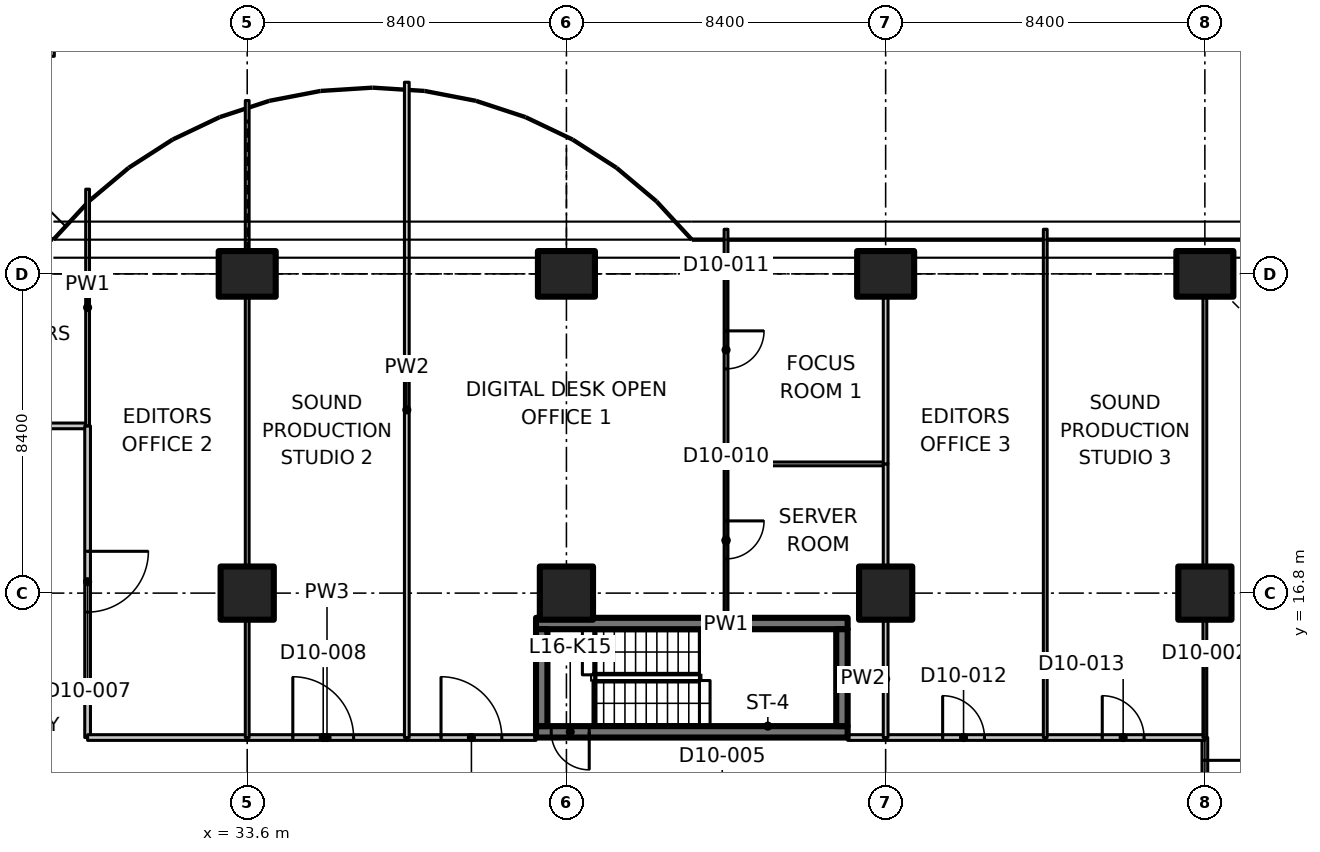
"""IFC4 building model, lengths in metres.
Left out: names, types, materials, properties, quantities, classifications, styles, units other than length and angle.
Written with IfcOpenShell. Run it as: python <this file> out.ifc"""

import sys

from ifc_helpers import new_model, si_unit, direction, frame, frame_2d, origin, origin_2d, place, context, subcontext, project, spatial, polyline, rectangle, outline, extrude, element, fill, save


model = new_model("IFC4")
c1 = context("Model", 3, precision=1e-05, world=origin(), true_north=direction((0.0, 1.0)))
c2 = subcontext(c1, "Body", "Model", "MODEL_VIEW")
j1 = project(units=[si_unit("LENGTHUNIT", "METRE"), si_unit("PLANEANGLEUNIT", "RADIAN")], contexts=[c1])
p1 = place(None, origin())
s1 = spatial("IfcSite", under=j1, at=p1, CompositionType="ELEMENT")
p2 = place(p1, origin())
s2 = spatial("IfcBuilding", under=s1, at=p2, CompositionType="ELEMENT")
p3 = place(p2, frame((0.0, 0.0, 72.5)))
s3 = spatial("IfcBuildingStorey", under=s2, at=p3, CompositionType="ELEMENT", Elevation=72.5)
p4 = place(p3, frame((33.6, 16.8, 0.0), z_axis=(0.0, 0.0, 1.0), x_axis=(1.0, 0.0, 0.0)))
e1 = element("IfcColumn", 1, at=p4, inside=s3, PredefinedType="COLUMN", context=c2, shape_type="SweptSolid", body=[
    extrude(rectangle(XDim=1.4, YDim=1.4, at=origin_2d()), origin(), (0.0, 0.0, 1.0), 3.35),
])
p5 = place(p3, frame((33.6, 25.2, 0.0), z_axis=(0.0, 0.0, 1.0), x_axis=(0.0, 1.0, 0.0)))
e2 = element("IfcColumn", 2, at=p5, inside=s3, PredefinedType="COLUMN", context=c2, shape_type="SweptSolid", body=[
    extrude(rectangle(XDim=1.2, YDim=1.5, at=origin_2d()), origin(), (0.0, 0.0, 1.0), 3.35),
])
p6 = place(p3, frame((42.0, 16.8, 0.0), z_axis=(0.0, 0.0, 1.0), x_axis=(1.0, 0.0, 0.0)))
e3 = element("IfcColumn", 3, at=p6, inside=s3, PredefinedType="COLUMN", context=c2, shape_type="SweptSolid", body=[
    extrude(rectangle(XDim=1.4, YDim=1.4, at=origin_2d()), origin(), (0.0, 0.0, 1.0), 3.35),
])
p7 = place(p3, frame((42.0, 25.2, 0.0), z_axis=(0.0, 0.0, 1.0), x_axis=(0.0, 1.0, 0.0)))
e4 = element("IfcColumn", 4, at=p7, inside=s3, PredefinedType="COLUMN", context=c2, shape_type="SweptSolid", body=[
    extrude(rectangle(XDim=1.2, YDim=1.5, at=origin_2d()), origin(), (0.0, 0.0, 1.0), 3.35),
])
p8 = place(p3, frame((50.4, 16.8, 0.0), z_axis=(0.0, 0.0, 1.0), x_axis=(1.0, 0.0, 0.0)))
e5 = element("IfcColumn", 5, at=p8, inside=s3, PredefinedType="COLUMN", context=c2, shape_type="SweptSolid", body=[
    extrude(rectangle(XDim=1.4, YDim=1.4, at=origin_2d()), origin(), (0.0, 0.0, 1.0), 3.35),
])
p9 = place(p3, frame((50.4, 25.2, 0.0), z_axis=(0.0, 0.0, 1.0), x_axis=(0.0, 1.0, 0.0)))
e6 = element("IfcColumn", 6, at=p9, inside=s3, PredefinedType="COLUMN", context=c2, shape_type="SweptSolid", body=[
    extrude(rectangle(XDim=1.2, YDim=1.5, at=origin_2d()), origin(), (0.0, 0.0, 1.0), 3.35),
])
p10 = place(p3, frame((58.8, 16.8, 0.0), z_axis=(0.0, 0.0, 1.0), x_axis=(1.0, 0.0, 0.0)))
e7 = element("IfcColumn", 7, at=p10, inside=s3, PredefinedType="COLUMN", context=c2, shape_type="SweptSolid", body=[
    extrude(rectangle(XDim=1.4, YDim=1.4, at=origin_2d()), origin(), (0.0, 0.0, 1.0), 3.35),
])
p11 = place(p3, frame((58.8, 25.2, 0.0), z_axis=(0.0, 0.0, 1.0), x_axis=(0.0, 1.0, 0.0)))
e8 = element("IfcColumn", 8, at=p11, inside=s3, PredefinedType="COLUMN", context=c2, shape_type="SweptSolid", body=[
    extrude(rectangle(XDim=1.2, YDim=1.5, at=origin_2d()), origin(), (0.0, 0.0, 1.0), 3.35),
])
p12 = place(p3, frame((49.4, 13.15, 0.0), z_axis=(0.0, 0.0, 1.0), x_axis=(-1.0, 0.0, 0.0)))
e9 = element("IfcWall", 9, at=p12, inside=s3, PredefinedType="SHEAR", context=c2, shape_type="SweptSolid", body=[
    extrude(rectangle(XDim=8.2, YDim=0.3, at=frame_2d((4.1, 0.0))), origin(), (0.0, 0.0, 1.0), 3.35),
])
p13 = place(p12, frame((6.8, 0.0, 0.0)))
e10 = element("IfcOpeningElement", 10, at=p13, cuts=e9, PredefinedType="OPENING", context=c2, shape_type="SweptSolid", body=[
    extrude(rectangle(XDim=1.0, YDim=2.1, at=frame_2d((0.5, 1.05))), frame((0.0, 0.16, 0.0), z_axis=(0.0, -1.0, 0.0), x_axis=(1.0, 0.0, 0.0)), (0.0, 0.0, 1.0), 0.32),
])
p14 = place(p3, frame((41.2, 16.0, 0.0), z_axis=(0.0, 0.0, 1.0), x_axis=(1.0, 0.0, 0.0)))
e11 = element("IfcWall", 11, at=p14, inside=s3, PredefinedType="SHEAR", context=c2, shape_type="SweptSolid", body=[
    extrude(rectangle(XDim=8.2, YDim=0.3, at=frame_2d((4.1, 0.0))), origin(), (0.0, 0.0, 1.0), 3.35),
])
for number, where, z_axis, x_axis in (
    (12, (41.35, 13.3, 0.0), (0.0, 0.0, 1.0), (0.0, 1.0, 0.0)),
    (13, (49.25, 13.3, 0.0), (0.0, 0.0, 1.0), (0.0, 1.0, 0.0)),
):
    element("IfcWall", number, at=place(p3, frame(where, z_axis=z_axis, x_axis=x_axis)), inside=s3, PredefinedType="SHEAR", context=c2, shape_type="SweptSolid", body=[
        extrude(rectangle(XDim=2.55, YDim=0.3, at=frame_2d((1.275, 0.0))), origin(), (0.0, 0.0, 1.0), 3.35),
    ])
p15 = place(p3, frame((25.2, 21.2, 0.0), z_axis=(0.0, 0.0, 1.0), x_axis=(1.0, 0.0, 0.0)))
e14 = element("IfcWall", 14, at=p15, inside=s3, PredefinedType="PARTITIONING", context=c2, shape_type="SweptSolid", body=[
    extrude(rectangle(XDim=4.2, YDim=0.15, at=frame_2d((2.1, 0.0))), origin(), (0.0, 0.0, 1.0), 3.33),
])
p16 = place(p3, frame((29.4, 21.2, 0.0), z_axis=(0.0, 0.0, 1.0), x_axis=(0.0, -1.0, 0.0)))
e15 = element("IfcWall", 15, at=p16, inside=s3, PredefinedType="PARTITIONING", context=c2, shape_type="SweptSolid", body=[
    extrude(rectangle(XDim=8.2, YDim=0.15, at=frame_2d((4.1, 0.0))), origin(), (0.0, 0.0, 1.0), 3.33),
])
p17 = place(p16, frame((3.3, 0.0, 0.0)))
e16 = element("IfcOpeningElement", 16, at=p17, cuts=e15, PredefinedType="OPENING", context=c2, shape_type="SweptSolid", body=[
    extrude(rectangle(XDim=1.6, YDim=2.1, at=frame_2d((0.8, 1.05))), frame((0.0, 0.085, 0.0), z_axis=(0.0, -1.0, 0.0), x_axis=(1.0, 0.0, 0.0)), (0.0, 0.0, 1.0), 0.17),
])
p18 = place(p3, frame((29.4, 27.429, 0.0), z_axis=(0.0, 0.0, 1.0), x_axis=(0.0, -1.0, 0.0)))
e17 = element("IfcWall", 17, at=p18, inside=s3, PredefinedType="PARTITIONING", context=c2, shape_type="SweptSolid", body=[
    extrude(outline(polyline([(0.0, 0.0), (6.229, 0.0), (6.229, 3.33), (2.679, 3.33), (2.677, 2.98), (1.781, 2.98), (1.779, 3.33), (0.154, 3.33), (0.0, 3.33), (0.0, 0.0)])), frame((0.0, 0.05, 0.0), z_axis=(0.0, -1.0, 0.0), x_axis=(1.0, 0.0, 0.0)), (0.0, 0.0, 1.0), 0.1),
])
p19 = place(p3, frame((25.2, 31.0, 0.0), z_axis=(0.0, 0.0, 1.0), x_axis=(1.0, 0.0, 0.0)))
e18 = element("IfcWall", 18, at=p19, inside=s3, PredefinedType="PARTITIONING", context=c2, shape_type="SweptSolid", body=[
    extrude(rectangle(XDim=3.324, YDim=0.15, at=frame_2d((1.662, 0.0))), origin(), (0.0, 0.0, 1.0), 2.98),
])
p20 = place(p3, frame((58.8, 13.0, 0.0), z_axis=(0.0, 0.0, 1.0), x_axis=(0.0, -1.0, 0.0)))
e19 = element("IfcWall", 19, at=p20, inside=s3, PredefinedType="PARTITIONING", context=c2, shape_type="SweptSolid", body=[
    extrude(rectangle(XDim=3.4, YDim=0.15, at=frame_2d((1.7, 0.0))), origin(), (0.0, 0.0, 1.0), 3.33),
])
p21 = place(p20, frame((0.6, 0.0, 0.0)))
e20 = element("IfcOpeningElement", 20, at=p21, cuts=e19, PredefinedType="OPENING", context=c2, shape_type="SweptSolid", body=[
    extrude(rectangle(XDim=2.0, YDim=2.4, at=frame_2d((1.0, 1.2))), frame((0.0, 0.085, 0.0), z_axis=(0.0, -1.0, 0.0), x_axis=(1.0, 0.0, 0.0)), (0.0, 0.0, 1.0), 0.17),
])
p22 = place(p3, frame((29.4, 13.0, 0.0), z_axis=(0.0, 0.0, 1.0), x_axis=(1.0, 0.0, 0.0)))
e21 = element("IfcWall", 21, at=p22, inside=s3, PredefinedType="PARTITIONING", context=c2, shape_type="SweptSolid", body=[
    extrude(rectangle(XDim=4.2, YDim=0.15, at=frame_2d((2.1, 0.0))), origin(), (0.0, 0.0, 1.0), 3.33),
])
p23 = place(p3, frame((33.6, 13.0, 0.0), z_axis=(0.0, 0.0, 1.0), x_axis=(1.0, 0.0, 0.0)))
e22 = element("IfcWall", 22, at=p23, inside=s3, PredefinedType="PARTITIONING", context=c2, shape_type="SweptSolid", body=[
    extrude(rectangle(XDim=4.2, YDim=0.15, at=frame_2d((2.1, 0.0))), origin(), (0.0, 0.0, 1.0), 3.33),
])
p24 = place(p23, frame((1.2, 0.0, 0.0)))
e23 = element("IfcOpeningElement", 23, at=p24, cuts=e22, PredefinedType="OPENING", context=c2, shape_type="SweptSolid", body=[
    extrude(rectangle(XDim=1.6, YDim=2.1, at=frame_2d((0.8, 1.05))), frame((0.0, 0.085, 0.0), z_axis=(0.0, -1.0, 0.0), x_axis=(1.0, 0.0, 0.0)), (0.0, 0.0, 1.0), 0.17),
])
p25 = place(p3, frame((37.8, 13.0, 0.0), z_axis=(0.0, 0.0, 1.0), x_axis=(1.0, 0.0, 0.0)))
e24 = element("IfcWall", 24, at=p25, inside=s3, PredefinedType="PARTITIONING", context=c2, shape_type="SweptSolid", body=[
    extrude(rectangle(XDim=3.4, YDim=0.15, at=frame_2d((1.7, 0.0))), origin(), (0.0, 0.0, 1.0), 3.33),
])
p26 = place(p25, frame((0.9, 0.0, 0.0)))
e25 = element("IfcOpeningElement", 25, at=p26, cuts=e24, PredefinedType="OPENING", context=c2, shape_type="SweptSolid", body=[
    extrude(rectangle(XDim=1.6, YDim=2.1, at=frame_2d((0.8, 1.05))), frame((0.0, 0.085, 0.0), z_axis=(0.0, -1.0, 0.0), x_axis=(1.0, 0.0, 0.0)), (0.0, 0.0, 1.0), 0.17),
])
p27 = place(p3, frame((49.4, 13.0, 0.0), z_axis=(0.0, 0.0, 1.0), x_axis=(1.0, 0.0, 0.0)))
e26 = element("IfcWall", 26, at=p27, inside=s3, PredefinedType="PARTITIONING", context=c2, shape_type="SweptSolid", body=[
    extrude(rectangle(XDim=1.0, YDim=0.15, at=frame_2d((0.5, 0.0))), origin(), (0.0, 0.0, 1.0), 3.33),
])
p28 = place(p3, frame((50.4, 13.0, 0.0), z_axis=(0.0, 0.0, 1.0), x_axis=(1.0, 0.0, 0.0)))
e27 = element("IfcWall", 27, at=p28, inside=s3, PredefinedType="PARTITIONING", context=c2, shape_type="SweptSolid", body=[
    extrude(rectangle(XDim=4.2, YDim=0.15, at=frame_2d((2.1, 0.0))), origin(), (0.0, 0.0, 1.0), 3.33),
])
p29 = place(p28, frame((1.5, 0.0, 0.0)))
e28 = element("IfcOpeningElement", 28, at=p29, cuts=e27, PredefinedType="OPENING", context=c2, shape_type="SweptSolid", body=[
    extrude(rectangle(XDim=1.1, YDim=2.1, at=frame_2d((0.55, 1.05))), frame((0.0, 0.085, 0.0), z_axis=(0.0, -1.0, 0.0), x_axis=(1.0, 0.0, 0.0)), (0.0, 0.0, 1.0), 0.17),
])
p30 = place(p3, frame((54.6, 13.0, 0.0), z_axis=(0.0, 0.0, 1.0), x_axis=(1.0, 0.0, 0.0)))
e29 = element("IfcWall", 29, at=p30, inside=s3, PredefinedType="PARTITIONING", context=c2, shape_type="SweptSolid", body=[
    extrude(rectangle(XDim=4.2, YDim=0.15, at=frame_2d((2.1, 0.0))), origin(), (0.0, 0.0, 1.0), 3.33),
])
p31 = place(p30, frame((1.5, 0.0, 0.0)))
e30 = element("IfcOpeningElement", 30, at=p31, cuts=e29, PredefinedType="OPENING", context=c2, shape_type="SweptSolid", body=[
    extrude(rectangle(XDim=1.1, YDim=2.1, at=frame_2d((0.55, 1.05))), frame((0.0, 0.085, 0.0), z_axis=(0.0, -1.0, 0.0), x_axis=(1.0, 0.0, 0.0)), (0.0, 0.0, 1.0), 0.17),
])
p32 = place(p3, frame((58.8, 13.0, 0.0), z_axis=(0.0, 0.0, 1.0), x_axis=(0.0, 1.0, 0.0)))
e31 = element("IfcWall", 31, at=p32, inside=s3, PredefinedType="PARTITIONING", context=c2, shape_type="SweptSolid", body=[
    extrude(rectangle(XDim=3.08, YDim=0.1, at=frame_2d((1.54, 0.0))), origin(), (0.0, 0.0, 1.0), 3.33),
])
p33 = place(p3, frame((58.8, 17.52, 0.0), z_axis=(0.0, 0.0, 1.0), x_axis=(0.0, 1.0, 0.0)))
e32 = element("IfcWall", 32, at=p33, inside=s3, PredefinedType="PARTITIONING", context=c2, shape_type="SweptSolid", body=[
    extrude(rectangle(XDim=7.06, YDim=0.1, at=frame_2d((3.53, 0.0))), origin(), (0.0, 0.0, 1.0), 3.33),
])
p34 = place(p3, frame((33.6, 29.762, 0.0), z_axis=(0.0, 0.0, 1.0), x_axis=(0.0, -1.0, 0.0)))
e33 = element("IfcWall", 33, at=p34, inside=s3, PredefinedType="PARTITIONING", context=c2, shape_type="SweptSolid", body=[
    extrude(rectangle(XDim=3.942, YDim=0.1, at=frame_2d((1.971, 0.0))), origin(), (0.0, 0.0, 1.0), 2.98),
])
p35 = place(p3, frame((33.6, 24.58, 0.0), z_axis=(0.0, 0.0, 1.0), x_axis=(0.0, -1.0, 0.0)))
e34 = element("IfcWall", 34, at=p35, inside=s3, PredefinedType="PARTITIONING", context=c2, shape_type="SweptSolid", body=[
    extrude(rectangle(XDim=7.06, YDim=0.1, at=frame_2d((3.53, 0.0))), origin(), (0.0, 0.0, 1.0), 3.33),
])
p36 = place(p3, frame((33.6, 16.08, 0.0), z_axis=(0.0, 0.0, 1.0), x_axis=(0.0, -1.0, 0.0)))
e35 = element("IfcWall", 35, at=p36, inside=s3, PredefinedType="PARTITIONING", context=c2, shape_type="SweptSolid", body=[
    extrude(rectangle(XDim=3.08, YDim=0.1, at=frame_2d((1.54, 0.0))), origin(), (0.0, 0.0, 1.0), 3.33),
])
p37 = place(p3, frame((37.8, 30.243, 0.0), z_axis=(0.0, 0.0, 1.0), x_axis=(0.0, -1.0, 0.0)))
e36 = element("IfcWall", 36, at=p37, inside=s3, PredefinedType="PARTITIONING", context=c2, shape_type="SweptSolid", body=[
    extrude(outline(polyline([(0.0, 0.0), (17.243, 0.0), (17.243, 3.33), (5.493, 3.33), (5.491, 2.98), (4.595, 2.98), (4.593, 3.33), (0.0, 3.33), (0.0, 0.0)])), frame((0.0, 0.062, 0.0), z_axis=(0.0, -1.0, 0.0), x_axis=(1.0, 0.0, 0.0)), (0.0, 0.0, 1.0), 0.125),
])
p38 = place(p3, frame((46.2, 20.2, 0.0), z_axis=(0.0, 0.0, 1.0), x_axis=(0.0, -1.0, 0.0)))
e37 = element("IfcWall", 37, at=p38, inside=s3, PredefinedType="PARTITIONING", context=c2, shape_type="SweptSolid", body=[
    extrude(rectangle(XDim=4.05, YDim=0.1, at=frame_2d((2.025, 0.0))), origin(), (0.0, 0.0, 1.0), 3.33),
])
p39 = place(p38, frame((1.5, 0.0, 0.0)))
e38 = element("IfcOpeningElement", 38, at=p39, cuts=e37, PredefinedType="OPENING", context=c2, shape_type="SweptSolid", body=[
    extrude(rectangle(XDim=1.0, YDim=2.1, at=frame_2d((0.5, 1.05))), frame((0.0, 0.06, 0.0), z_axis=(0.0, -1.0, 0.0), x_axis=(1.0, 0.0, 0.0)), (0.0, 0.0, 1.0), 0.12),
])
p40 = place(p3, frame((46.2, 26.374, 0.0), z_axis=(0.0, 0.0, 1.0), x_axis=(0.0, -1.0, 0.0)))
e39 = element("IfcWall", 39, at=p40, inside=s3, PredefinedType="PARTITIONING", context=c2, shape_type="SweptSolid", body=[
    extrude(outline(polyline([(0.0, 0.0), (6.174, 0.0), (6.174, 3.33), (1.624, 3.33), (1.622, 2.98), (0.726, 2.98), (0.724, 3.33), (0.074, 3.33), (0.0, 3.33), (0.0, 0.0)])), frame((0.0, 0.05, 0.0), z_axis=(0.0, -1.0, 0.0), x_axis=(1.0, 0.0, 0.0)), (0.0, 0.0, 1.0), 0.1),
])
p41 = place(p40, frame((2.674, 0.0, 0.0)))
e40 = element("IfcOpeningElement", 40, at=p41, cuts=e39, PredefinedType="OPENING", context=c2, shape_type="SweptSolid", body=[
    extrude(rectangle(XDim=1.0, YDim=2.1, at=frame_2d((0.5, 1.05))), frame((0.0, 0.06, 0.0), z_axis=(0.0, -1.0, 0.0), x_axis=(1.0, 0.0, 0.0)), (0.0, 0.0, 1.0), 0.12),
])
p42 = place(p3, frame((46.2, 20.2, 0.0), z_axis=(0.0, 0.0, 1.0), x_axis=(1.0, 0.0, 0.0)))
e41 = element("IfcWall", 41, at=p42, inside=s3, PredefinedType="PARTITIONING", context=c2, shape_type="SweptSolid", body=[
    extrude(rectangle(XDim=4.2, YDim=0.1, at=frame_2d((2.1, 0.0))), origin(), (0.0, 0.0, 1.0), 3.33),
])
p43 = place(p3, frame((50.4, 20.2, 0.0), z_axis=(0.0, 0.0, 1.0), x_axis=(0.0, -1.0, 0.0)))
e42 = element("IfcWall", 42, at=p43, inside=s3, PredefinedType="PARTITIONING", context=c2, shape_type="SweptSolid", body=[
    extrude(rectangle(XDim=2.68, YDim=0.125, at=frame_2d((1.34, 0.0))), origin(), (0.0, 0.0, 1.0), 3.33),
])
p44 = place(p3, frame((50.4, 16.08, 0.0), z_axis=(0.0, 0.0, 1.0), x_axis=(0.0, -1.0, 0.0)))
e43 = element("IfcWall", 43, at=p44, inside=s3, PredefinedType="PARTITIONING", context=c2, shape_type="SweptSolid", body=[
    extrude(rectangle(XDim=3.08, YDim=0.125, at=frame_2d((1.54, 0.0))), origin(), (0.0, 0.0, 1.0), 3.33),
])
p45 = place(p3, frame((50.4, 24.58, 0.0), z_axis=(0.0, 0.0, 1.0), x_axis=(0.0, -1.0, 0.0)))
e44 = element("IfcWall", 44, at=p45, inside=s3, PredefinedType="PARTITIONING", context=c2, shape_type="SweptSolid", body=[
    extrude(rectangle(XDim=4.38, YDim=0.125, at=frame_2d((2.19, 0.0))), origin(), (0.0, 0.0, 1.0), 3.33),
])
p46 = place(p3, frame((54.6, 26.374, 0.0), z_axis=(0.0, 0.0, 1.0), x_axis=(0.0, -1.0, 0.0)))
e45 = element("IfcWall", 45, at=p46, inside=s3, PredefinedType="PARTITIONING", context=c2, shape_type="SweptSolid", body=[
    extrude(outline(polyline([(0.0, 0.0), (13.374, 0.0), (13.374, 3.33), (1.624, 3.33), (1.622, 2.98), (0.726, 2.98), (0.724, 3.33), (0.074, 3.33), (0.0, 3.33), (0.0, 0.0)])), frame((0.0, 0.05, 0.0), z_axis=(0.0, -1.0, 0.0), x_axis=(1.0, 0.0, 0.0)), (0.0, 0.0, 1.0), 0.1),
])
p47 = place(p13, origin())
e46 = element("IfcDoor", 46, at=p47, inside=s3, OperationType="SINGLE_SWING_RIGHT", PredefinedType="DOOR", context=c2, shape_type="SweptSolid", body=[
    extrude(rectangle(XDim=1.0, YDim=2.1, at=frame_2d((0.5, 1.05))), frame((0.0, 0.025, 0.0), z_axis=(0.0, -1.0, 0.0), x_axis=(1.0, 0.0, 0.0)), (0.0, 0.0, 1.0), 0.05),
])
fill(e10, e46)
p48 = place(p21, origin())
e47 = element("IfcDoor", 47, at=p48, inside=s3, OperationType="DOUBLE_DOOR_SINGLE_SWING", PredefinedType="DOOR", context=c2, shape_type="SweptSolid", body=[
    extrude(rectangle(XDim=2.0, YDim=2.4, at=frame_2d((1.0, 1.2))), frame((0.0, 0.025, 0.0), z_axis=(0.0, -1.0, 0.0), x_axis=(1.0, 0.0, 0.0)), (0.0, 0.0, 1.0), 0.05),
])
fill(e20, e47)
p49 = place(p17, origin())
e48 = element("IfcDoor", 48, at=p49, inside=s3, OperationType="DOUBLE_DOOR_SINGLE_SWING", PredefinedType="DOOR", context=c2, shape_type="SweptSolid", body=[
    extrude(rectangle(XDim=1.6, YDim=2.1, at=frame_2d((0.8, 1.05))), frame((0.0, 0.025, 0.0), z_axis=(0.0, -1.0, 0.0), x_axis=(1.0, 0.0, 0.0)), (0.0, 0.0, 1.0), 0.05),
])
fill(e16, e48)
p50 = place(p24, origin())
e49 = element("IfcDoor", 49, at=p50, inside=s3, OperationType="DOUBLE_DOOR_SINGLE_SWING", PredefinedType="DOOR", context=c2, shape_type="SweptSolid", body=[
    extrude(rectangle(XDim=1.6, YDim=2.1, at=frame_2d((0.8, 1.05))), frame((0.0, 0.025, 0.0), z_axis=(0.0, -1.0, 0.0), x_axis=(1.0, 0.0, 0.0)), (0.0, 0.0, 1.0), 0.05),
])
fill(e23, e49)
p51 = place(p26, origin())
e50 = element("IfcDoor", 50, at=p51, inside=s3, OperationType="DOUBLE_DOOR_SINGLE_SWING", PredefinedType="DOOR", context=c2, shape_type="SweptSolid", body=[
    extrude(rectangle(XDim=1.6, YDim=2.1, at=frame_2d((0.8, 1.05))), frame((0.0, 0.025, 0.0), z_axis=(0.0, -1.0, 0.0), x_axis=(1.0, 0.0, 0.0)), (0.0, 0.0, 1.0), 0.05),
])
fill(e25, e50)
p52 = place(p39, origin())
e51 = element("IfcDoor", 51, at=p52, inside=s3, OperationType="SINGLE_SWING_LEFT", PredefinedType="DOOR", context=c2, shape_type="SweptSolid", body=[
    extrude(rectangle(XDim=1.0, YDim=2.1, at=frame_2d((0.5, 1.05))), frame((0.0, 0.025, 0.0), z_axis=(0.0, -1.0, 0.0), x_axis=(1.0, 0.0, 0.0)), (0.0, 0.0, 1.0), 0.05),
])
fill(e38, e51)
p53 = place(p41, origin())
e52 = element("IfcDoor", 52, at=p53, inside=s3, OperationType="SINGLE_SWING_LEFT", PredefinedType="DOOR", context=c2, shape_type="SweptSolid", body=[
    extrude(rectangle(XDim=1.0, YDim=2.1, at=frame_2d((0.5, 1.05))), frame((0.0, 0.025, 0.0), z_axis=(0.0, -1.0, 0.0), x_axis=(1.0, 0.0, 0.0)), (0.0, 0.0, 1.0), 0.05),
])
fill(e40, e52)
p54 = place(p29, origin())
e53 = element("IfcDoor", 53, at=p54, inside=s3, OperationType="SINGLE_SWING_LEFT", PredefinedType="DOOR", context=c2, shape_type="SweptSolid", body=[
    extrude(rectangle(XDim=1.1, YDim=2.1, at=frame_2d((0.55, 1.05))), frame((0.0, 0.025, 0.0), z_axis=(0.0, -1.0, 0.0), x_axis=(1.0, 0.0, 0.0)), (0.0, 0.0, 1.0), 0.05),
])
fill(e28, e53)
p55 = place(p31, origin())
e54 = element("IfcDoor", 54, at=p55, inside=s3, OperationType="SINGLE_SWING_LEFT", PredefinedType="DOOR", context=c2, shape_type="SweptSolid", body=[
    extrude(rectangle(XDim=1.1, YDim=2.1, at=frame_2d((0.55, 1.05))), frame((0.0, 0.025, 0.0), z_axis=(0.0, -1.0, 0.0), x_axis=(1.0, 0.0, 0.0)), (0.0, 0.0, 1.0), 0.05),
])
fill(e30, e54)
save(model, sys.argv[1])
